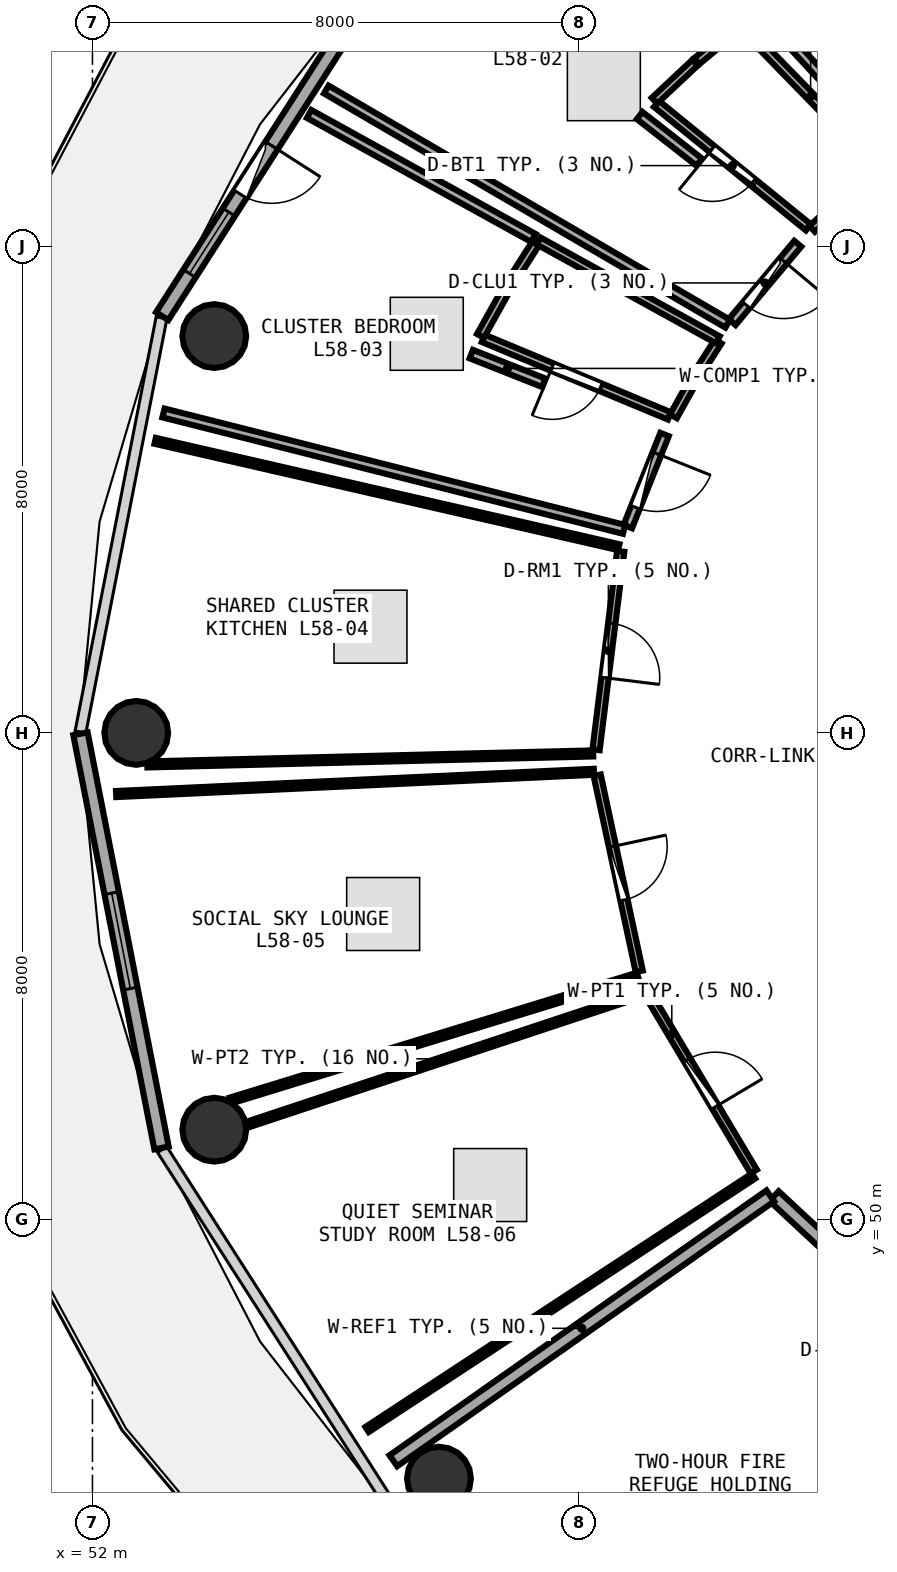
"""IFC4 building model, lengths in metres.
Left out: names, types, materials, properties, quantities, classifications, styles, units other than length and angle.
Written with IfcOpenShell. Run it as: python <this file> out.ifc"""

import sys

from ifc_helpers import new_model, si_unit, direction, frame, frame_2d, origin, origin_2d, place, context, subcontext, project, spatial, rectangle, circle, extrude, element, fill, save


model = new_model("IFC4")
c1 = context("Model", 3, precision=1e-05, world=origin(), true_north=direction((0.0, 1.0)))
c2 = subcontext(c1, "Body", "Model", "MODEL_VIEW")
j1 = project(units=[si_unit("LENGTHUNIT", "METRE"), si_unit("PLANEANGLEUNIT", "RADIAN")], contexts=[c1])
p1 = place(None, origin())
s1 = spatial("IfcSite", under=j1, at=p1, CompositionType="ELEMENT")
p2 = place(p1, origin())
s2 = spatial("IfcBuilding", under=s1, at=p2, CompositionType="ELEMENT")
p3 = place(p2, frame((0.0, 0.0, 226.95)))
s3 = spatial("IfcBuildingStorey", under=s2, at=p3, CompositionType="ELEMENT", Elevation=226.95)
for number, where, z_axis, x_axis in (
    (1, (54.003, 64.526, 0.0), (0.0, 0.0, 1.0), (1.0, 0.0, 0.0)),
    (2, (52.72, 58.0, 0.0), (0.0, 0.0, 1.0), (1.0, 0.0, 0.0)),
    (3, (54.003, 51.474, 0.0), (0.0, 0.0, 1.0), (1.0, 0.0, 0.0)),
    (4, (57.698, 45.736, 0.0), (0.0, 0.0, 1.0), (1.0, 0.0, 0.0)),
):
    element("IfcColumn", number, at=place(p3, frame(where, z_axis=z_axis, x_axis=x_axis)), inside=s3, PredefinedType="COLUMN", context=c2, shape_type="SweptSolid", body=[
        extrude(circle(Radius=0.525, at=origin_2d()), origin(), (0.0, 0.0, 1.0), 3.75),
    ])
p4 = place(p3, frame((56.986, 70.843, 0.0), z_axis=(0.0, 0.0, 1.0), x_axis=(-0.539539512973, -0.841960280501, 0.0)))
e5 = element("IfcWall", 5, at=p4, inside=s3, PredefinedType="SOLIDWALL", context=c2, shape_type="SweptSolid", body=[
    extrude(rectangle(XDim=7.115, YDim=0.24, at=frame_2d((3.557, 0.0))), origin(), (0.0, 0.0, 1.0), 3.475),
])
p5 = place(p4, frame((3.782, 0.0, 0.0)))
e6 = element("IfcOpeningElement", 6, at=p5, cuts=e5, PredefinedType="OPENING", context=c2, shape_type="SweptSolid", body=[
    extrude(rectangle(XDim=0.95, YDim=2.1, at=frame_2d((0.475, 1.05))), frame((0.0, 0.13, 0.0), z_axis=(0.0, -1.0, 0.0), x_axis=(1.0, 0.0, 0.0)), (0.0, 0.0, 1.0), 0.26),
])
p6 = place(p4, frame((5.082, 0.0, 0.85)))
e7 = element("IfcOpeningElement", 7, at=p6, cuts=e5, PredefinedType="OPENING", context=c2, shape_type="SweptSolid", body=[
    extrude(rectangle(XDim=1.2, YDim=1.45, at=frame_2d((0.6, 0.725))), frame((0.0, 0.13, 0.0), z_axis=(0.0, -1.0, 0.0), x_axis=(1.0, 0.0, 0.0)), (0.0, 0.0, 1.0), 0.26),
])
p7 = place(p3, frame((51.803, 57.985, 0.0), z_axis=(0.0, 0.0, 1.0), x_axis=(0.192069055673, -0.981381413036, 0.0)))
e8 = element("IfcWall", 8, at=p7, inside=s3, PredefinedType="SOLIDWALL", context=c2, shape_type="SweptSolid", body=[
    extrude(rectangle(XDim=6.94, YDim=0.24, at=frame_2d((3.47, 0.0))), origin(), (0.0, 0.0, 1.0), 3.475),
])
p8 = place(p7, frame((2.67, 0.0, 0.85)))
e9 = element("IfcOpeningElement", 9, at=p8, cuts=e8, PredefinedType="OPENING", context=c2, shape_type="SweptSolid", body=[
    extrude(rectangle(XDim=1.6, YDim=1.45, at=frame_2d((0.8, 0.725))), frame((0.0, 0.13, 0.0), z_axis=(0.0, -1.0, 0.0), x_axis=(1.0, 0.0, 0.0)), (0.0, 0.0, 1.0), 0.26),
])
p9 = place(p3, frame((63.774, 66.313, 0.0), z_axis=(0.0, 0.0, 1.0), x_axis=(-0.775898386577, 0.630857902945, 0.0)))
e10 = element("IfcWall", 10, at=p9, inside=s3, PredefinedType="PLUMBINGWALL", context=c2, shape_type="SweptSolid", body=[
    extrude(rectangle(XDim=3.222, YDim=0.13, at=frame_2d((1.611, 0.0))), origin(), (0.0, 0.0, 1.0), 3.025),
])
p10 = place(p9, frame((1.181, 0.0, 0.0)))
e11 = element("IfcOpeningElement", 11, at=p10, cuts=e10, PredefinedType="OPENING", context=c2, shape_type="SweptSolid", body=[
    extrude(rectangle(XDim=0.86, YDim=2.05, at=frame_2d((0.43, 1.025))), frame((0.0, 0.075, 0.0), z_axis=(0.0, -1.0, 0.0), x_axis=(1.0, 0.0, 0.0)), (0.0, 0.0, 1.0), 0.15),
])
p11 = place(p3, frame((63.6, 66.044, 0.0), z_axis=(0.0, 0.0, 1.0), x_axis=(-0.642238304801, -0.766505029238, 0.0)))
e12 = element("IfcWall", 12, at=p11, inside=s3, PredefinedType="PARTITIONING", context=c2, shape_type="SweptSolid", body=[
    extrude(rectangle(XDim=1.682, YDim=0.15, at=frame_2d((0.841, 0.0))), origin(), (0.0, 0.0, 1.0), 3.025),
])
p12 = place(p11, frame((0.366, 0.0, 0.0)))
e13 = element("IfcOpeningElement", 13, at=p12, cuts=e12, PredefinedType="OPENING", context=c2, shape_type="SweptSolid", body=[
    extrude(rectangle(XDim=0.95, YDim=2.08, at=frame_2d((0.475, 1.04))), frame((0.0, 0.085, 0.0), z_axis=(0.0, -1.0, 0.0), x_axis=(1.0, 0.0, 0.0)), (0.0, 0.0, 1.0), 0.17),
])
p13 = place(p3, frame((61.49, 63.212, 0.0), z_axis=(0.0, 0.0, 1.0), x_axis=(-0.923098696922, 0.38456312322, 0.0)))
e14 = element("IfcWall", 14, at=p13, inside=s3, PredefinedType="PLUMBINGWALL", context=c2, shape_type="SweptSolid", body=[
    extrude(rectangle(XDim=3.317, YDim=0.13, at=frame_2d((1.659, 0.0))), origin(), (0.0, 0.0, 1.0), 3.175),
])
p14 = place(p13, frame((1.229, 0.0, 0.0)))
e15 = element("IfcOpeningElement", 15, at=p14, cuts=e14, PredefinedType="OPENING", context=c2, shape_type="SweptSolid", body=[
    extrude(rectangle(XDim=0.86, YDim=2.05, at=frame_2d((0.43, 1.025))), frame((0.0, 0.075, 0.0), z_axis=(0.0, -1.0, 0.0), x_axis=(1.0, 0.0, 0.0)), (0.0, 0.0, 1.0), 0.15),
])
p15 = place(p3, frame((61.409, 62.907, 0.0), z_axis=(0.0, 0.0, 1.0), x_axis=(-0.370667853418, -0.928765493783, 0.0)))
e16 = element("IfcWall", 16, at=p15, inside=s3, PredefinedType="PARTITIONING", context=c2, shape_type="SweptSolid", body=[
    extrude(rectangle(XDim=1.631, YDim=0.15, at=frame_2d((0.815, 0.0))), origin(), (0.0, 0.0, 1.0), 3.235),
])
p16 = place(p15, frame((0.34, 0.0, 0.0)))
e17 = element("IfcOpeningElement", 17, at=p16, cuts=e16, PredefinedType="OPENING", context=c2, shape_type="SweptSolid", body=[
    extrude(rectangle(XDim=0.95, YDim=2.08, at=frame_2d((0.475, 1.04))), frame((0.0, 0.085, 0.0), z_axis=(0.0, -1.0, 0.0), x_axis=(1.0, 0.0, 0.0)), (0.0, 0.0, 1.0), 0.17),
])
p17 = place(p3, frame((60.688, 60.986, 0.0), z_axis=(0.0, 0.0, 1.0), x_axis=(-0.123175707892, -0.992384877447, 0.0)))
e18 = element("IfcWall", 18, at=p17, inside=s3, PredefinedType="PARTITIONING", context=c2, shape_type="SweptSolid", body=[
    extrude(rectangle(XDim=3.288, YDim=0.12, at=frame_2d((1.644, 0.0))), origin(), (0.0, 0.0, 1.0), 3.025),
])
p18 = place(p17, frame((1.194, 0.0, 0.0)))
e19 = element("IfcOpeningElement", 19, at=p18, cuts=e18, PredefinedType="OPENING", context=c2, shape_type="SweptSolid", body=[
    extrude(rectangle(XDim=0.9, YDim=2.08, at=frame_2d((0.45, 1.04))), frame((0.0, 0.07, 0.0), z_axis=(0.0, -1.0, 0.0), x_axis=(1.0, 0.0, 0.0)), (0.0, 0.0, 1.0), 0.14),
])
p19 = place(p3, frame((60.301, 57.303, 0.0), z_axis=(0.0, 0.0, 1.0), x_axis=(0.209791966594, -0.977746046145, 0.0)))
e20 = element("IfcWall", 20, at=p19, inside=s3, PredefinedType="PARTITIONING", context=c2, shape_type="SweptSolid", body=[
    extrude(rectangle(XDim=3.298, YDim=0.12, at=frame_2d((1.649, 0.0))), origin(), (0.0, 0.0, 1.0), 3.48),
])
p20 = place(p19, frame((1.199, 0.0, 0.0)))
e21 = element("IfcOpeningElement", 21, at=p20, cuts=e20, PredefinedType="OPENING", context=c2, shape_type="SweptSolid", body=[
    extrude(rectangle(XDim=0.9, YDim=2.08, at=frame_2d((0.45, 1.04))), frame((0.0, 0.07, 0.0), z_axis=(0.0, -1.0, 0.0), x_axis=(1.0, 0.0, 0.0)), (0.0, 0.0, 1.0), 0.14),
])
p21 = place(p3, frame((61.148, 53.685, 0.0), z_axis=(0.0, 0.0, 1.0), x_axis=(0.5120460613, -0.858957991468, 0.0)))
e22 = element("IfcWall", 22, at=p21, inside=s3, PredefinedType="PARTITIONING", context=c2, shape_type="SweptSolid", body=[
    extrude(rectangle(XDim=3.374, YDim=0.12, at=frame_2d((1.687, 0.0))), origin(), (0.0, 0.0, 1.0), 3.025),
])
p22 = place(p21, frame((1.237, 0.0, 0.0)))
e23 = element("IfcOpeningElement", 23, at=p22, cuts=e22, PredefinedType="OPENING", context=c2, shape_type="SweptSolid", body=[
    extrude(rectangle(XDim=0.9, YDim=2.08, at=frame_2d((0.45, 1.04))), frame((0.0, 0.07, 0.0), z_axis=(0.0, -1.0, 0.0), x_axis=(1.0, 0.0, 0.0)), (0.0, 0.0, 1.0), 0.14),
])
p23 = place(p3, frame((63.21, 50.382, 0.0), z_axis=(0.0, 0.0, 1.0), x_axis=(0.732365628242, -0.680911584987, 0.0)))
e24 = element("IfcWall", 24, at=p23, inside=s3, PredefinedType="SOLIDWALL", context=c2, shape_type="SweptSolid", body=[
    extrude(rectangle(XDim=2.643, YDim=0.22, at=frame_2d((1.321, 0.0))), origin(), (0.0, 0.0, 1.0), 3.025),
])
p24 = place(p3, frame((56.949, 46.03, 0.0), z_axis=(0.0, 0.0, 1.0), x_axis=(0.818217914941, 0.574908204559, 0.0)))
e25 = element("IfcWall", 25, at=p24, inside=s3, PredefinedType="SOLIDWALL", context=c2, shape_type="SweptSolid", body=[
    extrude(rectangle(XDim=7.577, YDim=0.22, at=frame_2d((3.789, 0.0))), origin(), (0.0, 0.0, 1.0), 3.075),
])
p25 = place(p3, frame((65.19, 67.507, 0.0), z_axis=(0.0, 0.0, 1.0), x_axis=(-0.679184519722, 0.733967566157, 0.0)))
e26 = element("IfcWall", 26, at=p25, inside=s3, PredefinedType="PARTITIONING", context=c2, shape_type="SweptSolid", body=[
    extrude(rectangle(XDim=7.407, YDim=0.15, at=frame_2d((3.703, 0.0))), origin(), (0.0, 0.0, 1.0), 3.025),
])
p26 = place(p3, frame((64.36, 66.779, 0.0), z_axis=(0.0, 0.0, 1.0), x_axis=(-0.73050113357, -0.682911483175, 0.0)))
e27 = element("IfcWall", 27, at=p26, inside=s3, PredefinedType="PLUMBINGWALL", context=c2, shape_type="SweptSolid", body=[
    extrude(rectangle(XDim=0.718, YDim=0.13, at=frame_2d((0.359, 0.0))), origin(), (0.0, 0.0, 1.0), 3.025),
])
p27 = place(p3, frame((61.243, 68.397, 0.0), z_axis=(0.0, 0.0, 1.0), x_axis=(0.729879325393, 0.683576016522, 0.0)))
e28 = element("IfcWall", 28, at=p27, inside=s3, PredefinedType="PLUMBINGWALL", context=c2, shape_type="SweptSolid", body=[
    extrude(rectangle(XDim=0.912, YDim=0.13, at=frame_2d((0.456, 0.0))), origin(), (0.0, 0.0, 1.0), 3.175),
])
p28 = place(p3, frame((61.938, 69.047, 0.0), z_axis=(0.0, 0.0, 1.0), x_axis=(0.768743942807, 0.639556682709, 0.0)))
e29 = element("IfcWall", 29, at=p28, inside=s3, PredefinedType="PLUMBINGWALL", context=c2, shape_type="SweptSolid", body=[
    extrude(rectangle(XDim=0.918, YDim=0.13, at=frame_2d((0.459, 0.0))), origin(), (0.0, 0.0, 1.0), 3.175),
])
p29 = place(p3, frame((62.674, 69.633, 0.0), z_axis=(0.0, 0.0, 1.0), x_axis=(0.697495291355, -0.716589365353, 0.0)))
e30 = element("IfcWall", 30, at=p29, inside=s3, PredefinedType="PLUMBINGWALL", context=c2, shape_type="SweptSolid", body=[
    extrude(rectangle(XDim=3.26, YDim=0.13, at=frame_2d((1.63, 0.0))), origin(), (0.0, 0.0, 1.0), 3.175),
])
p30 = place(p3, frame((62.446, 64.729, 0.0), z_axis=(0.0, 0.0, 1.0), x_axis=(-0.863764995437, 0.503894862703, 0.0)))
e31 = element("IfcWall", 31, at=p30, inside=s3, PredefinedType="PARTITIONING", context=c2, shape_type="SweptSolid", body=[
    extrude(rectangle(XDim=7.642, YDim=0.15, at=frame_2d((3.821, 0.0))), origin(), (0.0, 0.0, 1.0), 3.025),
])
p31 = place(p3, frame((61.0, 68.152, 0.0), z_axis=(0.0, 0.0, 1.0), x_axis=(0.787890342656, -0.615815563257, 0.0)))
e32 = element("IfcWall", 32, at=p31, inside=s3, PredefinedType="PARTITIONING", context=c2, shape_type="SweptSolid", body=[
    extrude(rectangle(XDim=1.243, YDim=0.15, at=frame_2d((0.622, 0.0))), origin(), (0.0, 0.0, 1.0), 3.025),
])
p32 = place(p3, frame((62.291, 64.438, 0.0), z_axis=(0.0, 0.0, 1.0), x_axis=(-0.538677920136, -0.842511779359, 0.0)))
e33 = element("IfcWall", 33, at=p32, inside=s3, PredefinedType="PLUMBINGWALL", context=c2, shape_type="SweptSolid", body=[
    extrude(rectangle(XDim=0.701, YDim=0.13, at=frame_2d((0.35, 0.0))), origin(), (0.0, 0.0, 1.0), 3.48),
])
p33 = place(p3, frame((61.893, 63.813, 0.0), z_axis=(0.0, 0.0, 1.0), x_axis=(-0.487222889134, -0.873277651325, 0.0)))
e34 = element("IfcWall", 34, at=p33, inside=s3, PredefinedType="PLUMBINGWALL", context=c2, shape_type="SweptSolid", body=[
    extrude(rectangle(XDim=0.695, YDim=0.13, at=frame_2d((0.348, 0.0))), origin(), (0.0, 0.0, 1.0), 3.48),
])
p34 = place(p3, frame((58.382, 64.529, 0.0), z_axis=(0.0, 0.0, 1.0), x_axis=(0.486816740093, 0.873504127961, 0.0)))
e35 = element("IfcWall", 35, at=p34, inside=s3, PredefinedType="PLUMBINGWALL", context=c2, shape_type="SweptSolid", body=[
    extrude(rectangle(XDim=0.883, YDim=0.13, at=frame_2d((0.441, 0.0))), origin(), (0.0, 0.0, 1.0), 3.025),
])
p35 = place(p3, frame((58.832, 65.334, 0.0), z_axis=(0.0, 0.0, 1.0), x_axis=(0.538866442337, 0.84239121394, 0.0)))
e36 = element("IfcWall", 36, at=p35, inside=s3, PredefinedType="PLUMBINGWALL", context=c2, shape_type="SweptSolid", body=[
    extrude(rectangle(XDim=0.888, YDim=0.13, at=frame_2d((0.444, 0.0))), origin(), (0.0, 0.0, 1.0), 3.48),
])
p36 = place(p3, frame((59.338, 66.089, 0.0), z_axis=(0.0, 0.0, 1.0), x_axis=(0.875659168238, -0.482929623322, 0.0)))
e37 = element("IfcWall", 37, at=p36, inside=s3, PredefinedType="PLUMBINGWALL", context=c2, shape_type="SweptSolid", body=[
    extrude(rectangle(XDim=3.364, YDim=0.13, at=frame_2d((1.682, 0.0))), origin(), (0.0, 0.0, 1.0), 3.025),
])
p37 = place(p3, frame((60.743, 61.347, 0.0), z_axis=(0.0, 0.0, 1.0), x_axis=(-0.969516227032, 0.245027111811, 0.0)))
e38 = element("IfcWall", 38, at=p37, inside=s3, PredefinedType="PARTITIONING", context=c2, shape_type="SweptSolid", body=[
    extrude(rectangle(XDim=7.814, YDim=0.15, at=frame_2d((3.907, 0.0))), origin(), (0.0, 0.0, 1.0), 3.075),
])
p38 = place(p3, frame((55.563, 68.179, 0.0), z_axis=(0.0, 0.0, 1.0), x_axis=(0.875174419458, -0.483807539757, 0.0)))
e39 = element("IfcWall", 39, at=p38, inside=s3, PredefinedType="PARTITIONING", context=c2, shape_type="SweptSolid", body=[
    extrude(rectangle(XDim=4.215, YDim=0.15, at=frame_2d((2.107, 0.0))), origin(), (0.0, 0.0, 1.0), 3.075),
])
p39 = place(p3, frame((58.23, 64.229, 0.0), z_axis=(0.0, 0.0, 1.0), x_axis=(0.929889476553, -0.367839042785, 0.0)))
e40 = element("IfcWall", 40, at=p39, inside=s3, PredefinedType="PARTITIONING", context=c2, shape_type="SweptSolid", body=[
    extrude(rectangle(XDim=1.281, YDim=0.15, at=frame_2d((0.641, 0.0))), origin(), (0.0, 0.0, 1.0), 3.175),
])
p40 = place(p3, frame((60.235, 57.662, 0.0), z_axis=(0.0, 0.0, 1.0), x_axis=(-0.999695784139, -0.024664532731, 0.0)))
e41 = element("IfcWall", 41, at=p40, inside=s3, PredefinedType="PARTITIONING", context=c2, shape_type="SweptSolid", body=[
    extrude(rectangle(XDim=7.335, YDim=0.1, at=frame_2d((3.667, 0.0))), origin(), (0.0, 0.0, 1.0), 3.075),
])
p41 = place(p3, frame((53.031, 62.803, 0.0), z_axis=(0.0, 0.0, 1.0), x_axis=(0.974686998683, -0.223573823597, 0.0)))
e42 = element("IfcWall", 42, at=p41, inside=s3, PredefinedType="PARTITIONING", context=c2, shape_type="SweptSolid", body=[
    extrude(rectangle(XDim=7.823, YDim=0.1, at=frame_2d((3.912, 0.0))), origin(), (0.0, 0.0, 1.0), 3.075),
])
p42 = place(p3, frame((60.967, 54.008, 0.0), z_axis=(0.0, 0.0, 1.0), x_axis=(-0.95603492311, -0.293252835954, 0.0)))
e43 = element("IfcWall", 43, at=p42, inside=s3, PredefinedType="PARTITIONING", context=c2, shape_type="SweptSolid", body=[
    extrude(rectangle(XDim=7.003, YDim=0.1, at=frame_2d((3.501, 0.0))), origin(), (0.0, 0.0, 1.0), 3.175),
])
p43 = place(p3, frame((52.389, 56.994, 0.0), z_axis=(0.0, 0.0, 1.0), x_axis=(0.998916130335, 0.046546369964, 0.0)))
e44 = element("IfcWall", 44, at=p43, inside=s3, PredefinedType="PARTITIONING", context=c2, shape_type="SweptSolid", body=[
    extrude(rectangle(XDim=7.868, YDim=0.1, at=frame_2d((3.934, 0.0))), origin(), (0.0, 0.0, 1.0), 3.075),
])
p44 = place(p3, frame((62.873, 50.713, 0.0), z_axis=(0.0, 0.0, 1.0), x_axis=(-0.836172653235, -0.548466310708, 0.0)))
e45 = element("IfcWall", 45, at=p44, inside=s3, PredefinedType="PARTITIONING", context=c2, shape_type="SweptSolid", body=[
    extrude(rectangle(XDim=7.602, YDim=0.1, at=frame_2d((3.801, 0.0))), origin(), (0.0, 0.0, 1.0), 3.075),
])
p45 = place(p3, frame((54.547, 51.558, 0.0), z_axis=(0.0, 0.0, 1.0), x_axis=(0.949189380639, 0.314705449082, 0.0)))
e46 = element("IfcWall", 46, at=p45, inside=s3, PredefinedType="PARTITIONING", context=c2, shape_type="SweptSolid", body=[
    extrude(rectangle(XDim=6.882, YDim=0.1, at=frame_2d((3.441, 0.0))), origin(), (0.0, 0.0, 1.0), 3.025),
])
p46 = place(p5, frame((0.95, 0.0, 0.0), z_axis=(0.0, 0.0, 1.0), x_axis=(-1.0, 0.0, 0.0)))
e47 = element("IfcDoor", 47, at=p46, inside=s3, OperationType="SINGLE_SWING_RIGHT", PredefinedType="DOOR", context=c2, shape_type="SweptSolid", body=[
    extrude(rectangle(XDim=0.95, YDim=2.1, at=frame_2d((0.475, 1.05))), frame((0.0, 0.025, 0.0), z_axis=(0.0, -1.0, 0.0), x_axis=(1.0, 0.0, 0.0)), (0.0, 0.0, 1.0), 0.05),
])
fill(e6, e47)
p47 = place(p6, origin())
e48 = element("IfcWindow", 48, at=p47, inside=s3, PartitioningType="SINGLE_PANEL", PredefinedType="WINDOW", context=c2, shape_type="SweptSolid", body=[
    extrude(rectangle(XDim=1.2, YDim=1.45, at=frame_2d((0.6, 0.725))), frame((0.0, 0.03, 0.0), z_axis=(0.0, -1.0, 0.0), x_axis=(1.0, 0.0, 0.0)), (0.0, 0.0, 1.0), 0.06),
])
fill(e7, e48)
p48 = place(p8, origin())
e49 = element("IfcWindow", 49, at=p48, inside=s3, PartitioningType="SINGLE_PANEL", PredefinedType="WINDOW", context=c2, shape_type="SweptSolid", body=[
    extrude(rectangle(XDim=1.6, YDim=1.45, at=frame_2d((0.8, 0.725))), frame((0.0, 0.03, 0.0), z_axis=(0.0, -1.0, 0.0), x_axis=(1.0, 0.0, 0.0)), (0.0, 0.0, 1.0), 0.06),
])
fill(e9, e49)
p49 = place(p10, origin())
e50 = element("IfcDoor", 50, at=p49, inside=s3, OperationType="SINGLE_SWING_RIGHT", PredefinedType="DOOR", context=c2, shape_type="SweptSolid", body=[
    extrude(rectangle(XDim=0.86, YDim=2.05, at=frame_2d((0.43, 1.025))), frame((0.0, 0.025, 0.0), z_axis=(0.0, -1.0, 0.0), x_axis=(1.0, 0.0, 0.0)), (0.0, 0.0, 1.0), 0.05),
])
fill(e11, e50)
p50 = place(p12, origin())
e51 = element("IfcDoor", 51, at=p50, inside=s3, OperationType="SINGLE_SWING_LEFT", PredefinedType="DOOR", context=c2, shape_type="SweptSolid", body=[
    extrude(rectangle(XDim=0.95, YDim=2.08, at=frame_2d((0.475, 1.04))), frame((0.0, 0.025, 0.0), z_axis=(0.0, -1.0, 0.0), x_axis=(1.0, 0.0, 0.0)), (0.0, 0.0, 1.0), 0.05),
])
fill(e13, e51)
p51 = place(p14, origin())
e52 = element("IfcDoor", 52, at=p51, inside=s3, OperationType="SINGLE_SWING_RIGHT", PredefinedType="DOOR", context=c2, shape_type="SweptSolid", body=[
    extrude(rectangle(XDim=0.86, YDim=2.05, at=frame_2d((0.43, 1.025))), frame((0.0, 0.025, 0.0), z_axis=(0.0, -1.0, 0.0), x_axis=(1.0, 0.0, 0.0)), (0.0, 0.0, 1.0), 0.05),
])
fill(e15, e52)
p52 = place(p16, origin())
e53 = element("IfcDoor", 53, at=p52, inside=s3, OperationType="SINGLE_SWING_LEFT", PredefinedType="DOOR", context=c2, shape_type="SweptSolid", body=[
    extrude(rectangle(XDim=0.95, YDim=2.08, at=frame_2d((0.475, 1.04))), frame((0.0, 0.025, 0.0), z_axis=(0.0, -1.0, 0.0), x_axis=(1.0, 0.0, 0.0)), (0.0, 0.0, 1.0), 0.05),
])
fill(e17, e53)
p53 = place(p18, origin())
e54 = element("IfcDoor", 54, at=p53, inside=s3, OperationType="SINGLE_SWING_RIGHT", PredefinedType="DOOR", context=c2, shape_type="SweptSolid", body=[
    extrude(rectangle(XDim=0.9, YDim=2.08, at=frame_2d((0.45, 1.04))), frame((0.0, 0.025, 0.0), z_axis=(0.0, -1.0, 0.0), x_axis=(1.0, 0.0, 0.0)), (0.0, 0.0, 1.0), 0.05),
])
fill(e19, e54)
p54 = place(p20, origin())
e55 = element("IfcDoor", 55, at=p54, inside=s3, OperationType="SINGLE_SWING_LEFT", PredefinedType="DOOR", context=c2, shape_type="SweptSolid", body=[
    extrude(rectangle(XDim=0.9, YDim=2.08, at=frame_2d((0.45, 1.04))), frame((0.0, 0.025, 0.0), z_axis=(0.0, -1.0, 0.0), x_axis=(1.0, 0.0, 0.0)), (0.0, 0.0, 1.0), 0.05),
])
fill(e21, e55)
p55 = place(p22, origin())
e56 = element("IfcDoor", 56, at=p55, inside=s3, OperationType="SINGLE_SWING_RIGHT", PredefinedType="DOOR", context=c2, shape_type="SweptSolid", body=[
    extrude(rectangle(XDim=0.9, YDim=2.08, at=frame_2d((0.45, 1.04))), frame((0.0, 0.025, 0.0), z_axis=(0.0, -1.0, 0.0), x_axis=(1.0, 0.0, 0.0)), (0.0, 0.0, 1.0), 0.05),
])
fill(e23, e56)
save(model, sys.argv[1])
